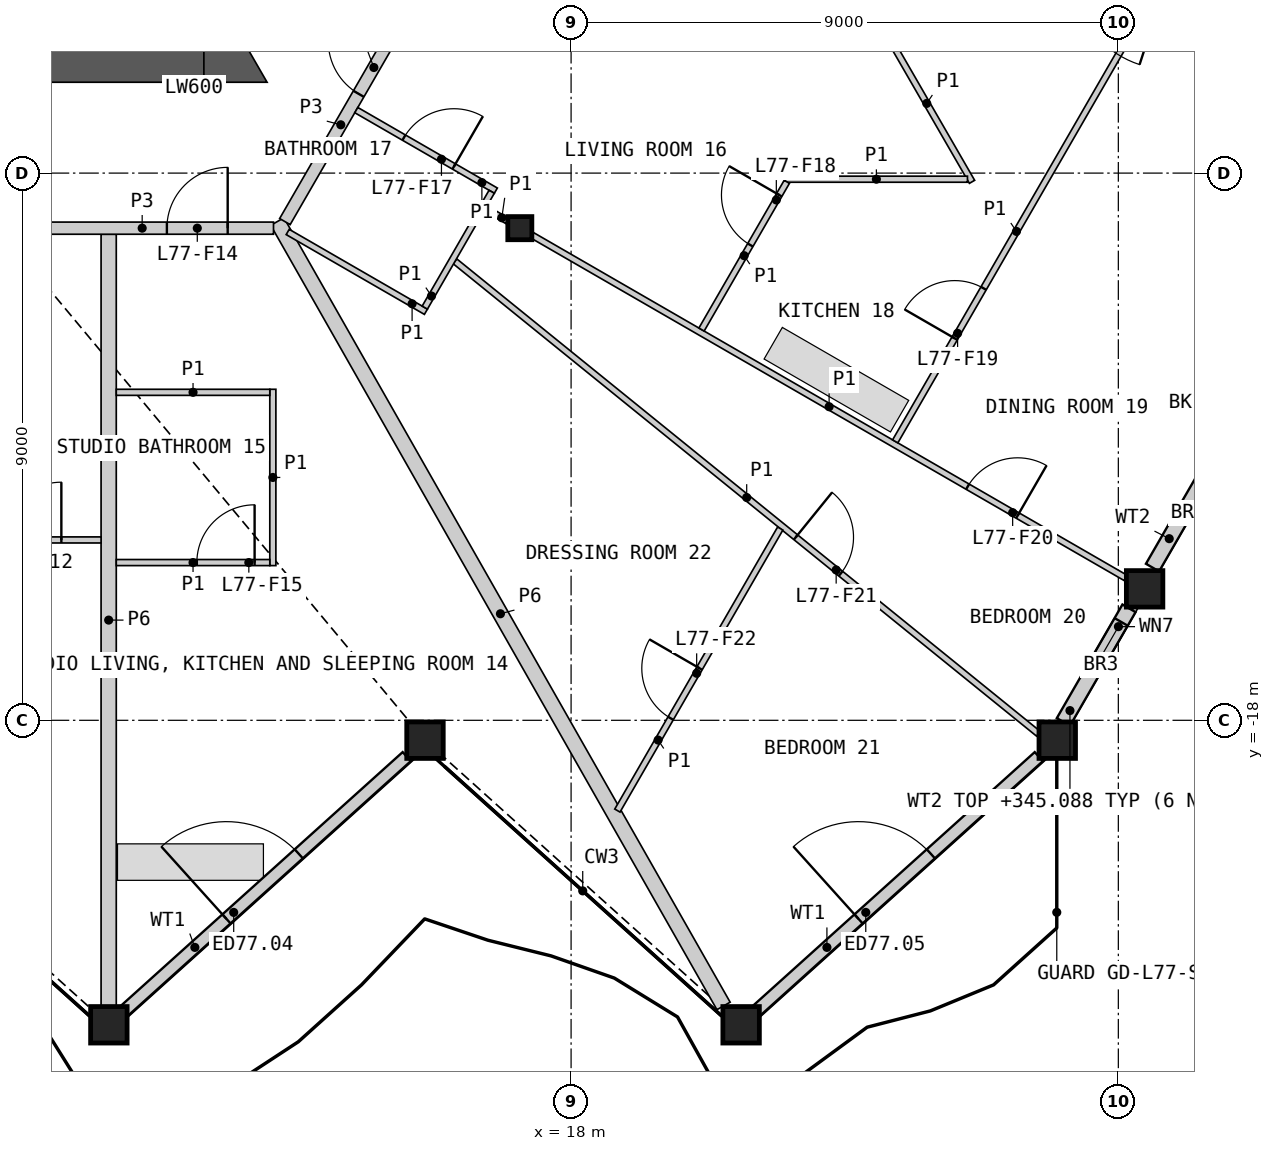
"""IFC4 building model, lengths in metres.
Left out: names, types, materials, properties, quantities, classifications, styles, units other than length and angle.
Written with IfcOpenShell. Run it as: python <this file> out.ifc"""

import sys

from ifc_helpers import new_model, si_unit, direction, frame, frame_2d, origin, origin_2d, place, context, subcontext, project, spatial, polyline, rectangle, hollow_rectangle, i_section, outline, extrude, element, fill, save


model = new_model("IFC4")
c1 = context("Model", 3, precision=1e-05, world=origin(), true_north=direction((0.0, 1.0)))
c2 = subcontext(c1, "Body", "Model", "MODEL_VIEW")
j1 = project(units=[si_unit("LENGTHUNIT", "METRE"), si_unit("PLANEANGLEUNIT", "RADIAN")], contexts=[c1])
p1 = place(None, origin())
s1 = spatial("IfcSite", under=j1, at=p1, CompositionType="ELEMENT")
p2 = place(p1, origin())
s2 = spatial("IfcBuilding", under=s1, at=p2, CompositionType="ELEMENT")
p3 = place(p2, frame((0.0, 0.0, 342.6)))
s3 = spatial("IfcBuildingStorey", under=s2, at=p3, CompositionType="ELEMENT", Elevation=342.6)
for number, where, z_axis, x_axis in (
    (1, (10.398, -23.008, 0.0), (0.0, 0.0, 1.0), (1.0, 0.0, 0.0)),
    (2, (15.597, -18.327, 0.0), (0.0, 0.0, 1.0), (1.0, 0.0, 0.0)),
    (3, (20.796, -23.008, 0.0), (0.0, 0.0, 1.0), (1.0, 0.0, 0.0)),
    (4, (25.995, -18.327, 0.0), (0.0, 0.0, 1.0), (1.0, 0.0, 0.0)),
    (5, (27.432, -15.838, 0.0), (0.0, 0.0, 1.0), (1.0, 0.0, 0.0)),
):
    element("IfcColumn", number, at=place(p3, frame(where, z_axis=z_axis, x_axis=x_axis)), inside=s3, PredefinedType="COLUMN", context=c2, shape_type="SweptSolid", body=[
        extrude(hollow_rectangle(XDim=0.6, YDim=0.6, WallThickness=0.04, at=origin_2d()), origin(), (0.0, 0.0, 1.0), 3.4),
    ])
p4 = place(p3, frame((17.157, -9.906, 0.0), z_axis=(0.0, 0.0, 1.0), x_axis=(1.0, 0.0, 0.0)))
e6 = element("IfcColumn", 6, at=p4, inside=s3, PredefinedType="COLUMN", context=c2, shape_type="SweptSolid", body=[
    extrude(i_section(OverallWidth=0.396, OverallDepth=0.381, WebThickness=0.019, FlangeThickness=0.03, at=origin_2d()), origin(), (0.0, 0.0, 1.0), 3.4),
])
p5 = place(p3, frame((10.651, -22.781, 0.0), z_axis=(0.0, 0.0, 1.0), x_axis=(0.743154335217, 0.669120044572, 0.0)))
e7 = element("IfcWall", 7, at=p5, inside=s3, PredefinedType="SOLIDWALL", context=c2, shape_type="SweptSolid", body=[
    extrude(rectangle(XDim=6.252, YDim=0.2, at=frame_2d((3.126, 0.0))), origin(), (0.0, 0.0, 1.0), 2.488),
])
p6 = place(p5, frame((2.263, 0.0, 0.0)))
e8 = element("IfcOpeningElement", 8, at=p6, cuts=e7, PredefinedType="OPENING", context=c2, shape_type="SweptSolid", body=[
    extrude(rectangle(XDim=1.6, YDim=2.25, at=frame_2d((0.8, 1.125))), frame((0.0, 0.11, 0.0), z_axis=(0.0, -1.0, 0.0), x_axis=(1.0, 0.0, 0.0)), (0.0, 0.0, 1.0), 0.22),
])
p7 = place(p3, frame((21.046, -22.781, 0.0), z_axis=(0.0, 0.0, 1.0), x_axis=(0.743154335217, 0.669120044572, 0.0)))
e9 = element("IfcWall", 9, at=p7, inside=s3, PredefinedType="SOLIDWALL", context=c2, shape_type="SweptSolid", body=[
    extrude(rectangle(XDim=6.252, YDim=0.2, at=frame_2d((3.126, 0.0))), origin(), (0.0, 0.0, 1.0), 2.488),
])
p8 = place(p7, frame((2.263, 0.0, 0.0)))
e10 = element("IfcOpeningElement", 10, at=p8, cuts=e9, PredefinedType="OPENING", context=c2, shape_type="SweptSolid", body=[
    extrude(rectangle(XDim=1.6, YDim=2.25, at=frame_2d((0.8, 1.125))), frame((0.0, 0.11, 0.0), z_axis=(0.0, -1.0, 0.0), x_axis=(1.0, 0.0, 0.0)), (0.0, 0.0, 1.0), 0.22),
])
p9 = place(p3, frame((26.096, -18.027, 0.0), z_axis=(0.0, 0.0, 1.0), x_axis=(0.499983569942, 0.866034889475, 0.0)))
e11 = element("IfcWall", 11, at=p9, inside=s3, PredefinedType="SOLIDWALL", context=c2, shape_type="SweptSolid", body=[
    extrude(rectangle(XDim=2.158, YDim=0.25, at=frame_2d((1.079, 0.0))), origin(), (0.0, 0.0, 1.0), 2.488),
])
p10 = place(p9, frame((1.0, 0.0, 1.6)))
e12 = element("IfcOpeningElement", 12, at=p10, cuts=e11, PredefinedType="OPENING", context=c2, shape_type="SweptSolid", body=[
    extrude(rectangle(XDim=0.9, YDim=0.6, at=frame_2d((0.45, 0.3))), frame((0.0, 0.135, 0.0), z_axis=(0.0, -1.0, 0.0), x_axis=(1.0, 0.0, 0.0)), (0.0, 0.0, 1.0), 0.27),
])
p11 = place(p3, frame((27.562, -15.488, 0.0), z_axis=(0.0, 0.0, 1.0), x_axis=(0.500049712553, 0.865996700326, 0.0)))
e13 = element("IfcWall", 13, at=p11, inside=s3, PredefinedType="SOLIDWALL", context=c2, shape_type="SweptSolid", body=[
    extrude(rectangle(XDim=2.196, YDim=0.25, at=frame_2d((1.098, 0.0))), origin(), (0.0, 0.0, 1.0), 2.488),
])
p12 = place(p3, frame((-11.961, -7.206, 0.0), z_axis=(0.0, 0.0, 1.0), x_axis=(1.0, 0.0, 0.0)))
e14 = element("IfcWall", 14, at=p12, inside=s3, PredefinedType="SHEAR", context=c2, shape_type="SweptSolid", body=[
    extrude(rectangle(XDim=23.921, YDim=0.6, at=frame_2d((11.961, 0.0))), origin(), (0.0, 0.0, 1.0), 3.1),
])
p13 = place(p3, origin())
e15 = element("IfcWall", 15, at=p13, inside=s3, PredefinedType="SHEAR", context=c2, shape_type="SweptSolid", body=[
    extrude(outline(polyline([(11.961, -7.506), (11.961, -6.906), (12.48, -6.606), (13.0, -7.506), (11.961, -7.506)])), origin(), (0.0, 0.0, 1.0), 3.1),
])
p14 = place(p3, frame((13.169, -9.797, 0.0), z_axis=(0.0, 0.0, 1.0), x_axis=(0.494414335079, -0.869226360201, 0.0)))
e16 = element("IfcWall", 16, at=p14, inside=s3, PredefinedType="PARTITIONING", context=c2, shape_type="SweptSolid", body=[
    extrude(rectangle(XDim=14.842, YDim=0.25, at=frame_2d((7.421, 0.0))), origin(), (0.0, 0.0, 1.0), 2.33),
])
p15 = place(p3, frame((10.395, -22.698, 0.0), z_axis=(0.0, 0.0, 1.0), x_axis=(0.0, 1.0, 0.0)))
e17 = element("IfcWall", 17, at=p15, inside=s3, PredefinedType="PARTITIONING", context=c2, shape_type="SweptSolid", body=[
    extrude(rectangle(XDim=12.692, YDim=0.25, at=frame_2d((6.346, 0.0))), origin(), (0.0, 0.0, 1.0), 2.33),
])
p16 = place(p3, frame((8.786, -9.906, 0.0), z_axis=(0.0, 0.0, 1.0), x_axis=(1.0, 0.0, 0.0)))
e18 = element("IfcWall", 18, at=p16, inside=s3, PredefinedType="PARTITIONING", context=c2, shape_type="SweptSolid", body=[
    extrude(rectangle(XDim=4.32, YDim=0.2, at=frame_2d((2.16, 0.0))), origin(), (0.0, 0.0, 1.0), 3.1),
])
p17 = place(p16, frame((2.566, 0.0, 0.0)))
e19 = element("IfcOpeningElement", 19, at=p17, cuts=e18, PredefinedType="OPENING", context=c2, shape_type="SweptSolid", body=[
    extrude(rectangle(XDim=1.0, YDim=2.1, at=frame_2d((0.5, 1.05))), frame((0.0, 0.11, 0.0), z_axis=(0.0, -1.0, 0.0), x_axis=(1.0, 0.0, 0.0)), (0.0, 0.0, 1.0), 0.22),
])
p18 = place(p3, frame((13.293, -9.797, 0.0), z_axis=(0.0, 0.0, 1.0), x_axis=(0.499967746641, 0.866044024469, 0.0)))
e20 = element("IfcWall", 20, at=p18, inside=s3, PredefinedType="PARTITIONING", context=c2, shape_type="SweptSolid", body=[
    extrude(rectangle(XDim=3.676, YDim=0.2, at=frame_2d((1.838, 0.0))), origin(), (0.0, 0.0, 1.0), 3.1),
])
p19 = place(p18, frame((2.426, 0.0, 0.0)))
e21 = element("IfcOpeningElement", 21, at=p19, cuts=e20, PredefinedType="OPENING", context=c2, shape_type="SweptSolid", body=[
    extrude(rectangle(XDim=1.0, YDim=2.1, at=frame_2d((0.5, 1.05))), frame((0.0, 0.11, 0.0), z_axis=(0.0, -1.0, 0.0), x_axis=(1.0, 0.0, 0.0)), (0.0, 0.0, 1.0), 0.22),
])
p20 = place(p3, frame((16.091, -10.451, 0.0), z_axis=(0.0, 0.0, 1.0), x_axis=(0.77714308631, -0.629323941544, 0.0)))
e22 = element("IfcWall", 22, at=p20, inside=s3, PredefinedType="PARTITIONING", context=c2, shape_type="SweptSolid", body=[
    extrude(rectangle(XDim=12.346, YDim=0.1, at=frame_2d((6.173, 0.0))), origin(), (0.0, 0.0, 1.0), 2.33),
])
p21 = place(p20, frame((7.211, 0.0, 0.0)))
e23 = element("IfcOpeningElement", 23, at=p21, cuts=e22, PredefinedType="OPENING", context=c2, shape_type="SweptSolid", body=[
    extrude(rectangle(XDim=0.95, YDim=2.1, at=frame_2d((0.475, 1.05))), frame((0.0, 0.06, 0.0), z_axis=(0.0, -1.0, 0.0), x_axis=(1.0, 0.0, 0.0)), (0.0, 0.0, 1.0), 0.12),
])
p22 = place(p3, frame((17.365, -10.025, 0.0), z_axis=(0.0, 0.0, 1.0), x_axis=(0.866021046153, -0.500007547564, 0.0)))
e24 = element("IfcWall", 24, at=p22, inside=s3, PredefinedType="PARTITIONING", context=c2, shape_type="SweptSolid", body=[
    extrude(rectangle(XDim=11.267, YDim=0.1, at=frame_2d((5.634, 0.0))), origin(), (0.0, 0.0, 1.0), 2.33),
])
p23 = place(p22, frame((8.264, 0.0, 0.0)))
e25 = element("IfcOpeningElement", 25, at=p23, cuts=e24, PredefinedType="OPENING", context=c2, shape_type="SweptSolid", body=[
    extrude(rectangle(XDim=0.95, YDim=2.1, at=frame_2d((0.475, 1.05))), frame((0.0, 0.06, 0.0), z_axis=(0.0, -1.0, 0.0), x_axis=(1.0, 0.0, 0.0)), (0.0, 0.0, 1.0), 0.12),
])
p24 = place(p3, frame((0.05, -15.033, 0.0), z_axis=(0.0, 0.0, 1.0), x_axis=(1.0, 0.0, 0.0)))
e26 = element("IfcWall", 26, at=p24, inside=s3, PredefinedType="PARTITIONING", context=c2, shape_type="SweptSolid", body=[
    extrude(rectangle(XDim=10.22, YDim=0.1, at=frame_2d((5.11, 0.0))), origin(), (0.0, 0.0, 1.0), 2.33),
])
p25 = place(p24, frame((0.855, 0.0, 0.0)))
e27 = element("IfcOpeningElement", 27, at=p25, cuts=e26, PredefinedType="OPENING", context=c2, shape_type="SweptSolid", body=[
    extrude(rectangle(XDim=0.95, YDim=2.1, at=frame_2d((0.475, 1.05))), frame((0.0, 0.06, 0.0), z_axis=(0.0, -1.0, 0.0), x_axis=(1.0, 0.0, 0.0)), (0.0, 0.0, 1.0), 0.12),
])
p26 = place(p24, frame((8.617, 0.0, 0.0)))
e28 = element("IfcOpeningElement", 28, at=p26, cuts=e26, PredefinedType="OPENING", context=c2, shape_type="SweptSolid", body=[
    extrude(rectangle(XDim=0.95, YDim=2.1, at=frame_2d((0.475, 1.05))), frame((0.0, 0.06, 0.0), z_axis=(0.0, -1.0, 0.0), x_axis=(1.0, 0.0, 0.0)), (0.0, 0.0, 1.0), 0.12),
])
p27 = place(p3, frame((23.331, -13.412, 0.0), z_axis=(0.0, 0.0, 1.0), x_axis=(0.499994510044, 0.866028573389, 0.0)))
e29 = element("IfcWall", 29, at=p27, inside=s3, PredefinedType="PARTITIONING", context=c2, shape_type="SweptSolid", body=[
    extrude(rectangle(XDim=7.975, YDim=0.1, at=frame_2d((3.988, 0.0))), origin(), (0.0, 0.0, 1.0), 2.33),
])
p28 = place(p27, frame((1.957, 0.0, 0.0)))
e30 = element("IfcOpeningElement", 30, at=p28, cuts=e29, PredefinedType="OPENING", context=c2, shape_type="SweptSolid", body=[
    extrude(rectangle(XDim=0.95, YDim=2.1, at=frame_2d((0.475, 1.05))), frame((0.0, 0.06, 0.0), z_axis=(0.0, -1.0, 0.0), x_axis=(1.0, 0.0, 0.0)), (0.0, 0.0, 1.0), 0.12),
])
p29 = place(p3, frame((18.761, -19.485, 0.0), z_axis=(0.0, 0.0, 1.0), x_axis=(0.500031527488, 0.866007200615, 0.0)))
e31 = element("IfcWall", 31, at=p29, inside=s3, PredefinedType="PARTITIONING", context=c2, shape_type="SweptSolid", body=[
    extrude(rectangle(XDim=5.356, YDim=0.1, at=frame_2d((2.678, 0.0))), origin(), (0.0, 0.0, 1.0), 2.33),
])
p30 = place(p29, frame((1.752, 0.0, 0.0)))
e32 = element("IfcOpeningElement", 32, at=p30, cuts=e31, PredefinedType="OPENING", context=c2, shape_type="SweptSolid", body=[
    extrude(rectangle(XDim=0.95, YDim=2.1, at=frame_2d((0.475, 1.05))), frame((0.0, 0.06, 0.0), z_axis=(0.0, -1.0, 0.0), x_axis=(1.0, 0.0, 0.0)), (0.0, 0.0, 1.0), 0.12),
])
p31 = place(p3, frame((23.104, -6.563, 0.0), z_axis=(0.0, 0.0, 1.0), x_axis=(0.499999078476, -0.866025935826, 0.0)))
e33 = element("IfcWall", 33, at=p31, inside=s3, PredefinedType="PARTITIONING", context=c2, shape_type="SweptSolid", body=[
    extrude(rectangle(XDim=2.979, YDim=0.1, at=frame_2d((1.49, 0.0))), origin(), (0.0, 0.0, 1.0), 2.33),
])
p32 = place(p3, frame((21.523, -9.1, 0.0), z_axis=(0.0, 0.0, 1.0), x_axis=(1.0, 0.0, 0.0)))
e34 = element("IfcWall", 34, at=p32, inside=s3, PredefinedType="PARTITIONING", context=c2, shape_type="SweptSolid", body=[
    extrude(rectangle(XDim=2.996, YDim=0.1, at=frame_2d((1.498, 0.0))), origin(), (0.0, 0.0, 1.0), 2.33),
])
p33 = place(p3, frame((20.145, -11.573, 0.0), z_axis=(0.0, 0.0, 1.0), x_axis=(0.49998612769, 0.866033412818, 0.0)))
e35 = element("IfcWall", 35, at=p33, inside=s3, PredefinedType="PARTITIONING", context=c2, shape_type="SweptSolid", body=[
    extrude(rectangle(XDim=2.805, YDim=0.1, at=frame_2d((1.403, 0.0))), origin(), (0.0, 0.0, 1.0), 2.33),
])
p34 = place(p33, frame((1.605, 0.0, 0.0)))
e36 = element("IfcOpeningElement", 36, at=p34, cuts=e35, PredefinedType="OPENING", context=c2, shape_type="SweptSolid", body=[
    extrude(rectangle(XDim=0.95, YDim=2.1, at=frame_2d((0.475, 1.05))), frame((0.0, 0.06, 0.0), z_axis=(0.0, -1.0, 0.0), x_axis=(1.0, 0.0, 0.0)), (0.0, 0.0, 1.0), 0.12),
])
p35 = place(p3, frame((13.095, -15.456, 0.0), z_axis=(0.0, 0.0, 1.0), x_axis=(0.0, 1.0, 0.0)))
e37 = element("IfcWall", 37, at=p35, inside=s3, PredefinedType="PARTITIONING", context=c2, shape_type="SweptSolid", body=[
    extrude(rectangle(XDim=2.9, YDim=0.1, at=frame_2d((1.45, 0.0))), origin(), (0.0, 0.0, 1.0), 2.33),
])
p36 = place(p3, frame((10.52, -12.606, 0.0), z_axis=(0.0, 0.0, 1.0), x_axis=(1.0, 0.0, 0.0)))
e38 = element("IfcWall", 38, at=p36, inside=s3, PredefinedType="PARTITIONING", context=c2, shape_type="SweptSolid", body=[
    extrude(rectangle(XDim=2.525, YDim=0.1, at=frame_2d((1.263, 0.0))), origin(), (0.0, 0.0, 1.0), 2.33),
])
p37 = place(p3, frame((10.52, -15.406, 0.0), z_axis=(0.0, 0.0, 1.0), x_axis=(1.0, 0.0, 0.0)))
e39 = element("IfcWall", 39, at=p37, inside=s3, PredefinedType="PARTITIONING", context=c2, shape_type="SweptSolid", body=[
    extrude(rectangle(XDim=2.525, YDim=0.1, at=frame_2d((1.263, 0.0))), origin(), (0.0, 0.0, 1.0), 2.33),
])
p38 = place(p37, frame((1.325, 0.0, 0.0)))
e40 = element("IfcOpeningElement", 40, at=p38, cuts=e39, PredefinedType="OPENING", context=c2, shape_type="SweptSolid", body=[
    extrude(rectangle(XDim=0.95, YDim=2.1, at=frame_2d((0.475, 1.05))), frame((0.0, 0.06, 0.0), z_axis=(0.0, -1.0, 0.0), x_axis=(1.0, 0.0, 0.0)), (0.0, 0.0, 1.0), 0.12),
])
p39 = place(p3, frame((14.468, -7.964, 0.0), z_axis=(0.0, 0.0, 1.0), x_axis=(0.865989200783, -0.500062700197, 0.0)))
e41 = element("IfcWall", 41, at=p39, inside=s3, PredefinedType="PARTITIONING", context=c2, shape_type="SweptSolid", body=[
    extrude(rectangle(XDim=2.65, YDim=0.1, at=frame_2d((1.325, 0.0))), origin(), (0.0, 0.0, 1.0), 2.33),
])
p40 = place(p39, frame((0.905, 0.0, 0.0)))
e42 = element("IfcOpeningElement", 42, at=p40, cuts=e41, PredefinedType="OPENING", context=c2, shape_type="SweptSolid", body=[
    extrude(rectangle(XDim=0.95, YDim=2.1, at=frame_2d((0.475, 1.05))), frame((0.0, 0.06, 0.0), z_axis=(0.0, -1.0, 0.0), x_axis=(1.0, 0.0, 0.0)), (0.0, 0.0, 1.0), 0.12),
])
p41 = place(p3, frame((13.339, -9.968, 0.0), z_axis=(0.0, 0.0, 1.0), x_axis=(0.866036909293, -0.499980071345, 0.0)))
e43 = element("IfcWall", 43, at=p41, inside=s3, PredefinedType="PARTITIONING", context=c2, shape_type="SweptSolid", body=[
    extrude(rectangle(XDim=2.625, YDim=0.1, at=frame_2d((1.312, 0.0))), origin(), (0.0, 0.0, 1.0), 2.33),
])
p42 = place(p3, frame((15.594, -11.212, 0.0), z_axis=(0.0, 0.0, 1.0), x_axis=(0.499898558967, 0.866083962871, 0.0)))
e44 = element("IfcWall", 44, at=p42, inside=s3, PredefinedType="PARTITIONING", context=c2, shape_type="SweptSolid", body=[
    extrude(rectangle(XDim=2.2, YDim=0.1, at=frame_2d((1.1, 0.0))), origin(), (0.0, 0.0, 1.0), 2.33),
])
p43 = place(p3, frame((16.594, -9.581, 0.0), z_axis=(0.0, 0.0, 1.0), x_axis=(0.866036909293, -0.499980071345, 0.0)))
e45 = element("IfcWall", 45, at=p43, inside=s3, PredefinedType="PARTITIONING", context=c2, shape_type="SweptSolid", body=[
    extrude(rectangle(XDim=0.41, YDim=0.1, at=frame_2d((0.205, 0.0))), origin(), (0.0, 0.0, 1.0), 2.33),
])
p44 = place(p6, origin())
e46 = element("IfcDoor", 46, at=p44, inside=s3, OperationType="DOUBLE_DOOR_SINGLE_SWING", PredefinedType="DOOR", context=c2, shape_type="SweptSolid", body=[
    extrude(rectangle(XDim=1.6, YDim=2.25, at=frame_2d((0.8, 1.125))), frame((0.0, 0.025, 0.0), z_axis=(0.0, -1.0, 0.0), x_axis=(1.0, 0.0, 0.0)), (0.0, 0.0, 1.0), 0.05),
])
fill(e8, e46)
p45 = place(p8, origin())
e47 = element("IfcDoor", 47, at=p45, inside=s3, OperationType="DOUBLE_DOOR_SINGLE_SWING", PredefinedType="DOOR", context=c2, shape_type="SweptSolid", body=[
    extrude(rectangle(XDim=1.6, YDim=2.25, at=frame_2d((0.8, 1.125))), frame((0.0, 0.025, 0.0), z_axis=(0.0, -1.0, 0.0), x_axis=(1.0, 0.0, 0.0)), (0.0, 0.0, 1.0), 0.05),
])
fill(e10, e47)
p46 = place(p10, origin())
e48 = element("IfcWindow", 48, at=p46, inside=s3, PartitioningType="SINGLE_PANEL", PredefinedType="WINDOW", context=c2, shape_type="SweptSolid", body=[
    extrude(rectangle(XDim=0.9, YDim=0.6, at=frame_2d((0.45, 0.3))), frame((0.0, 0.03, 0.0), z_axis=(0.0, -1.0, 0.0), x_axis=(1.0, 0.0, 0.0)), (0.0, 0.0, 1.0), 0.06),
])
fill(e12, e48)
p47 = place(p26, origin())
e49 = element("IfcDoor", 49, at=p47, inside=s3, OperationType="SINGLE_SWING_RIGHT", PredefinedType="DOOR", context=c2, shape_type="SweptSolid", body=[
    extrude(rectangle(XDim=0.95, YDim=2.1, at=frame_2d((0.475, 1.05))), frame((0.0, 0.025, 0.0), z_axis=(0.0, -1.0, 0.0), x_axis=(1.0, 0.0, 0.0)), (0.0, 0.0, 1.0), 0.05),
])
fill(e28, e49)
p48 = place(p17, origin())
e50 = element("IfcDoor", 50, at=p48, inside=s3, OperationType="SINGLE_SWING_RIGHT", PredefinedType="DOOR", context=c2, shape_type="SweptSolid", body=[
    extrude(rectangle(XDim=1.0, YDim=2.1, at=frame_2d((0.5, 1.05))), frame((0.0, 0.025, 0.0), z_axis=(0.0, -1.0, 0.0), x_axis=(1.0, 0.0, 0.0)), (0.0, 0.0, 1.0), 0.05),
])
fill(e19, e50)
p49 = place(p38, origin())
e51 = element("IfcDoor", 51, at=p49, inside=s3, OperationType="SINGLE_SWING_RIGHT", PredefinedType="DOOR", context=c2, shape_type="SweptSolid", body=[
    extrude(rectangle(XDim=0.95, YDim=2.1, at=frame_2d((0.475, 1.05))), frame((0.0, 0.025, 0.0), z_axis=(0.0, -1.0, 0.0), x_axis=(1.0, 0.0, 0.0)), (0.0, 0.0, 1.0), 0.05),
])
fill(e40, e51)
p50 = place(p19, origin())
e52 = element("IfcDoor", 52, at=p50, inside=s3, OperationType="SINGLE_SWING_RIGHT", PredefinedType="DOOR", context=c2, shape_type="SweptSolid", body=[
    extrude(rectangle(XDim=1.0, YDim=2.1, at=frame_2d((0.5, 1.05))), frame((0.0, 0.025, 0.0), z_axis=(0.0, -1.0, 0.0), x_axis=(1.0, 0.0, 0.0)), (0.0, 0.0, 1.0), 0.05),
])
fill(e21, e52)
p51 = place(p40, origin())
e53 = element("IfcDoor", 53, at=p51, inside=s3, OperationType="SINGLE_SWING_RIGHT", PredefinedType="DOOR", context=c2, shape_type="SweptSolid", body=[
    extrude(rectangle(XDim=0.95, YDim=2.1, at=frame_2d((0.475, 1.05))), frame((0.0, 0.025, 0.0), z_axis=(0.0, -1.0, 0.0), x_axis=(1.0, 0.0, 0.0)), (0.0, 0.0, 1.0), 0.05),
])
fill(e42, e53)
p52 = place(p34, origin())
e54 = element("IfcDoor", 54, at=p52, inside=s3, OperationType="SINGLE_SWING_RIGHT", PredefinedType="DOOR", context=c2, shape_type="SweptSolid", body=[
    extrude(rectangle(XDim=0.95, YDim=2.1, at=frame_2d((0.475, 1.05))), frame((0.0, 0.025, 0.0), z_axis=(0.0, -1.0, 0.0), x_axis=(1.0, 0.0, 0.0)), (0.0, 0.0, 1.0), 0.05),
])
fill(e36, e54)
p53 = place(p28, origin())
e55 = element("IfcDoor", 55, at=p53, inside=s3, OperationType="SINGLE_SWING_LEFT", PredefinedType="DOOR", context=c2, shape_type="SweptSolid", body=[
    extrude(rectangle(XDim=0.95, YDim=2.1, at=frame_2d((0.475, 1.05))), frame((0.0, 0.025, 0.0), z_axis=(0.0, -1.0, 0.0), x_axis=(1.0, 0.0, 0.0)), (0.0, 0.0, 1.0), 0.05),
])
fill(e30, e55)
p54 = place(p23, origin())
e56 = element("IfcDoor", 56, at=p54, inside=s3, OperationType="SINGLE_SWING_RIGHT", PredefinedType="DOOR", context=c2, shape_type="SweptSolid", body=[
    extrude(rectangle(XDim=0.95, YDim=2.1, at=frame_2d((0.475, 1.05))), frame((0.0, 0.025, 0.0), z_axis=(0.0, -1.0, 0.0), x_axis=(1.0, 0.0, 0.0)), (0.0, 0.0, 1.0), 0.05),
])
fill(e25, e56)
p55 = place(p21, origin())
e57 = element("IfcDoor", 57, at=p55, inside=s3, OperationType="SINGLE_SWING_LEFT", PredefinedType="DOOR", context=c2, shape_type="SweptSolid", body=[
    extrude(rectangle(XDim=0.95, YDim=2.1, at=frame_2d((0.475, 1.05))), frame((0.0, 0.025, 0.0), z_axis=(0.0, -1.0, 0.0), x_axis=(1.0, 0.0, 0.0)), (0.0, 0.0, 1.0), 0.05),
])
fill(e23, e57)
p56 = place(p30, origin())
e58 = element("IfcDoor", 58, at=p56, inside=s3, OperationType="SINGLE_SWING_RIGHT", PredefinedType="DOOR", context=c2, shape_type="SweptSolid", body=[
    extrude(rectangle(XDim=0.95, YDim=2.1, at=frame_2d((0.475, 1.05))), frame((0.0, 0.025, 0.0), z_axis=(0.0, -1.0, 0.0), x_axis=(1.0, 0.0, 0.0)), (0.0, 0.0, 1.0), 0.05),
])
fill(e32, e58)
save(model, sys.argv[1])
